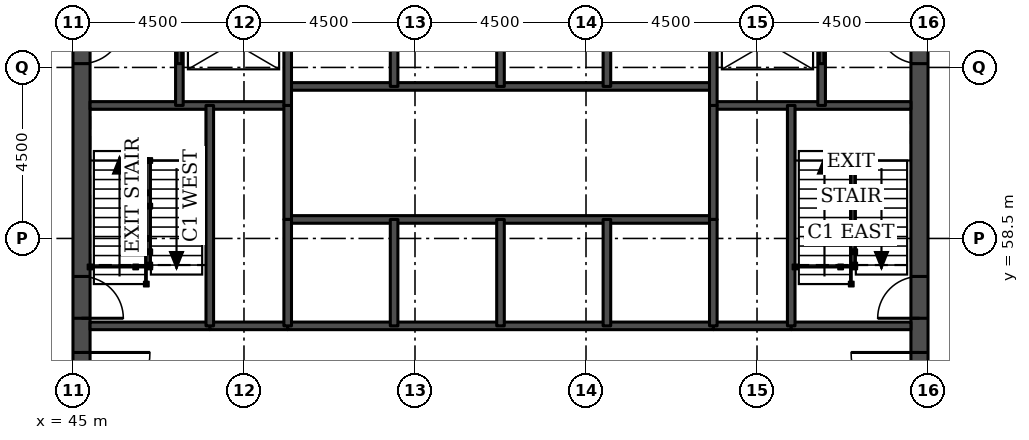
"""IFC4 building model, lengths in metres.
Left out: names, types, materials, properties, quantities, classifications, styles, units other than length and angle.
Written with IfcOpenShell. Run it as: python <this file> out.ifc"""

import sys

from ifc_helpers import new_model, si_unit, direction, frame, frame_2d, origin, place, context, subcontext, project, spatial, rectangle, extrude, element, fill, save


model = new_model("IFC4")
c1 = context("Model", 3, precision=1e-05, world=origin(), true_north=direction((0.0, 1.0)))
c2 = subcontext(c1, "Body", "Model", "MODEL_VIEW")
j1 = project(units=[si_unit("LENGTHUNIT", "METRE"), si_unit("PLANEANGLEUNIT", "RADIAN")], contexts=[c1])
p1 = place(None, origin())
s1 = spatial("IfcSite", under=j1, at=p1, CompositionType="ELEMENT")
p2 = place(p1, origin())
s2 = spatial("IfcBuilding", under=s1, at=p2, CompositionType="ELEMENT")
p3 = place(p2, frame((0.0, 0.0, 101.1)))
s3 = spatial("IfcBuildingStorey", under=s2, at=p3, CompositionType="ELEMENT", Elevation=101.1)
p4 = place(p3, frame((45.225, 49.5, 0.0), z_axis=(0.0, 0.0, 1.0), x_axis=(0.0, 1.0, 0.0)))
e1 = element("IfcWall", 1, at=p4, inside=s3, PredefinedType="SHEAR", context=c2, shape_type="SweptSolid", body=[
    extrude(rectangle(XDim=22.5, YDim=0.45, at=frame_2d((11.25, 0.0))), origin(), (0.0, 0.0, 1.0), 3.7),
])
p5 = place(p4, frame((4.2, 0.0, 0.0)))
e2 = element("IfcOpeningElement", 2, at=p5, cuts=e1, PredefinedType="OPENING", context=c2, shape_type="SweptSolid", body=[
    extrude(rectangle(XDim=1.8, YDim=2.1, at=frame_2d((0.9, 1.05))), frame((0.0, 0.235, 0.0), z_axis=(0.0, -1.0, 0.0), x_axis=(1.0, 0.0, 0.0)), (0.0, 0.0, 1.0), 0.47),
])
p6 = place(p4, frame((6.9, 0.0, 0.0)))
e3 = element("IfcOpeningElement", 3, at=p6, cuts=e1, PredefinedType="OPENING", context=c2, shape_type="SweptSolid", body=[
    extrude(rectangle(XDim=1.1, YDim=2.1, at=frame_2d((0.55, 1.05))), frame((0.0, 0.235, 0.0), z_axis=(0.0, -1.0, 0.0), x_axis=(1.0, 0.0, 0.0)), (0.0, 0.0, 1.0), 0.47),
])
p7 = place(p4, frame((13.6, 0.0, 0.0)))
e4 = element("IfcOpeningElement", 4, at=p7, cuts=e1, PredefinedType="OPENING", context=c2, shape_type="SweptSolid", body=[
    extrude(rectangle(XDim=1.1, YDim=2.1, at=frame_2d((0.55, 1.05))), frame((0.0, 0.235, 0.0), z_axis=(0.0, -1.0, 0.0), x_axis=(1.0, 0.0, 0.0)), (0.0, 0.0, 1.0), 0.47),
])
p8 = place(p4, frame((16.5, 0.0, 0.0)))
e5 = element("IfcOpeningElement", 5, at=p8, cuts=e1, PredefinedType="OPENING", context=c2, shape_type="SweptSolid", body=[
    extrude(rectangle(XDim=1.8, YDim=2.1, at=frame_2d((0.9, 1.05))), frame((0.0, 0.235, 0.0), z_axis=(0.0, -1.0, 0.0), x_axis=(1.0, 0.0, 0.0)), (0.0, 0.0, 1.0), 0.47),
])
p9 = place(p3, frame((67.275, 49.5, 0.0), z_axis=(0.0, 0.0, 1.0), x_axis=(0.0, 1.0, 0.0)))
e6 = element("IfcWall", 6, at=p9, inside=s3, PredefinedType="SHEAR", context=c2, shape_type="SweptSolid", body=[
    extrude(rectangle(XDim=22.5, YDim=0.45, at=frame_2d((11.25, 0.0))), origin(), (0.0, 0.0, 1.0), 3.7),
])
p10 = place(p9, frame((4.2, 0.0, 0.0)))
e7 = element("IfcOpeningElement", 7, at=p10, cuts=e6, PredefinedType="OPENING", context=c2, shape_type="SweptSolid", body=[
    extrude(rectangle(XDim=1.8, YDim=2.1, at=frame_2d((0.9, 1.05))), frame((0.0, 0.235, 0.0), z_axis=(0.0, -1.0, 0.0), x_axis=(1.0, 0.0, 0.0)), (0.0, 0.0, 1.0), 0.47),
])
p11 = place(p9, frame((6.9, 0.0, 0.0)))
e8 = element("IfcOpeningElement", 8, at=p11, cuts=e6, PredefinedType="OPENING", context=c2, shape_type="SweptSolid", body=[
    extrude(rectangle(XDim=1.1, YDim=2.1, at=frame_2d((0.55, 1.05))), frame((0.0, 0.235, 0.0), z_axis=(0.0, -1.0, 0.0), x_axis=(1.0, 0.0, 0.0)), (0.0, 0.0, 1.0), 0.47),
])
p12 = place(p9, frame((13.6, 0.0, 0.0)))
e9 = element("IfcOpeningElement", 9, at=p12, cuts=e6, PredefinedType="OPENING", context=c2, shape_type="SweptSolid", body=[
    extrude(rectangle(XDim=1.1, YDim=2.1, at=frame_2d((0.55, 1.05))), frame((0.0, 0.235, 0.0), z_axis=(0.0, -1.0, 0.0), x_axis=(1.0, 0.0, 0.0)), (0.0, 0.0, 1.0), 0.47),
])
p13 = place(p9, frame((16.5, 0.0, 0.0)))
e10 = element("IfcOpeningElement", 10, at=p13, cuts=e6, PredefinedType="OPENING", context=c2, shape_type="SweptSolid", body=[
    extrude(rectangle(XDim=1.8, YDim=2.1, at=frame_2d((0.9, 1.05))), frame((0.0, 0.235, 0.0), z_axis=(0.0, -1.0, 0.0), x_axis=(1.0, 0.0, 0.0)), (0.0, 0.0, 1.0), 0.47),
])
for number, where, z_axis, x_axis in (
    (11, (48.6, 56.2, 0.0), (0.0, 0.0, 1.0), (1.0, 0.0, 0.0)),
    (12, (61.85, 56.2, 0.0), (0.0, 0.0, 1.0), (1.0, 0.0, 0.0)),
):
    element("IfcWall", number, at=place(p3, frame(where, z_axis=z_axis, x_axis=x_axis)), inside=s3, PredefinedType="SOLIDWALL", context=c2, shape_type="SweptSolid", body=[
        extrude(rectangle(XDim=2.05, YDim=0.2, at=frame_2d((1.025, 0.0))), origin(), (0.0, 0.0, 1.0), 3.55),
    ])
p14 = place(p3, frame((45.45, 56.2, 0.0), z_axis=(0.0, 0.0, 1.0), x_axis=(1.0, 0.0, 0.0)))
e13 = element("IfcWall", 13, at=p14, inside=s3, PredefinedType="SOLIDWALL", context=c2, shape_type="SweptSolid", body=[
    extrude(rectangle(XDim=3.15, YDim=0.2, at=frame_2d((1.575, 0.0))), origin(), (0.0, 0.0, 1.0), 3.55),
])
p15 = place(p3, frame((50.65, 56.2, 0.0), z_axis=(0.0, 0.0, 1.0), x_axis=(1.0, 0.0, 0.0)))
e14 = element("IfcWall", 14, at=p15, inside=s3, PredefinedType="SOLIDWALL", context=c2, shape_type="SweptSolid", body=[
    extrude(rectangle(XDim=11.2, YDim=0.2, at=frame_2d((5.6, 0.0))), origin(), (0.0, 0.0, 1.0), 3.55),
])
p16 = place(p3, frame((63.9, 56.2, 0.0), z_axis=(0.0, 0.0, 1.0), x_axis=(1.0, 0.0, 0.0)))
e15 = element("IfcWall", 15, at=p16, inside=s3, PredefinedType="SOLIDWALL", context=c2, shape_type="SweptSolid", body=[
    extrude(rectangle(XDim=3.15, YDim=0.2, at=frame_2d((1.575, 0.0))), origin(), (0.0, 0.0, 1.0), 3.55),
])
p17 = place(p3, frame((50.65, 59.0, 0.0), z_axis=(0.0, 0.0, 1.0), x_axis=(1.0, 0.0, 0.0)))
e16 = element("IfcWall", 16, at=p17, inside=s3, PredefinedType="SOLIDWALL", context=c2, shape_type="SweptSolid", body=[
    extrude(rectangle(XDim=11.2, YDim=0.2, at=frame_2d((5.6, 0.0))), origin(), (0.0, 0.0, 1.0), 3.7),
])
for number, where, z_axis, x_axis in (
    (17, (45.45, 62.0, 0.0), (0.0, 0.0, 1.0), (1.0, 0.0, 0.0)),
    (18, (61.85, 62.0, 0.0), (0.0, 0.0, 1.0), (1.0, 0.0, 0.0)),
):
    element("IfcWall", number, at=place(p3, frame(where, z_axis=z_axis, x_axis=x_axis)), inside=s3, PredefinedType="SOLIDWALL", context=c2, shape_type="SweptSolid", body=[
        extrude(rectangle(XDim=5.2, YDim=0.2, at=frame_2d((2.6, 0.0))), origin(), (0.0, 0.0, 1.0), 3.55),
    ])
p18 = place(p3, frame((50.65, 62.5, 0.0), z_axis=(0.0, 0.0, 1.0), x_axis=(1.0, 0.0, 0.0)))
e19 = element("IfcWall", 19, at=p18, inside=s3, PredefinedType="SOLIDWALL", context=c2, shape_type="SweptSolid", body=[
    extrude(rectangle(XDim=11.2, YDim=0.2, at=frame_2d((5.6, 0.0))), origin(), (0.0, 0.0, 1.0), 3.7),
])
p19 = place(p3, frame((47.8, 62.0, 0.0), z_axis=(0.0, 0.0, 1.0), x_axis=(0.0, 1.0, 0.0)))
e20 = element("IfcWall", 20, at=p19, inside=s3, PredefinedType="SOLIDWALL", context=c2, shape_type="SweptSolid", body=[
    extrude(rectangle(XDim=3.3, YDim=0.2, at=frame_2d((1.65, 0.0))), origin(), (0.0, 0.0, 1.0), 3.55),
])
p20 = place(p19, frame((1.1, 0.0, 0.0)))
e21 = element("IfcOpeningElement", 21, at=p20, cuts=e20, PredefinedType="OPENING", context=c2, shape_type="SweptSolid", body=[
    extrude(rectangle(XDim=1.1, YDim=2.1, at=frame_2d((0.55, 1.05))), frame((0.0, 0.11, 0.0), z_axis=(0.0, -1.0, 0.0), x_axis=(1.0, 0.0, 0.0)), (0.0, 0.0, 1.0), 0.22),
])
p21 = place(p3, frame((48.6, 56.2, 0.0), z_axis=(0.0, 0.0, 1.0), x_axis=(0.0, 1.0, 0.0)))
e22 = element("IfcWall", 22, at=p21, inside=s3, PredefinedType="SOLIDWALL", context=c2, shape_type="SweptSolid", body=[
    extrude(rectangle(XDim=5.8, YDim=0.2, at=frame_2d((2.9, 0.0))), origin(), (0.0, 0.0, 1.0), 3.55),
])
p22 = place(p3, frame((50.65, 59.0, 0.0), z_axis=(0.0, 0.0, 1.0), x_axis=(0.0, 1.0, 0.0)))
e23 = element("IfcWall", 23, at=p22, inside=s3, PredefinedType="SOLIDWALL", context=c2, shape_type="SweptSolid", body=[
    extrude(rectangle(XDim=3.0, YDim=0.2, at=frame_2d((1.5, 0.0))), origin(), (0.0, 0.0, 1.0), 3.7),
])
p23 = place(p3, frame((50.65, 56.2, 0.0), z_axis=(0.0, 0.0, 1.0), x_axis=(0.0, 1.0, 0.0)))
e24 = element("IfcWall", 24, at=p23, inside=s3, PredefinedType="SOLIDWALL", context=c2, shape_type="SweptSolid", body=[
    extrude(rectangle(XDim=2.8, YDim=0.2, at=frame_2d((1.4, 0.0))), origin(), (0.0, 0.0, 1.0), 3.55),
])
p24 = place(p3, frame((50.65, 62.0, 0.0), z_axis=(0.0, 0.0, 1.0), x_axis=(0.0, 1.0, 0.0)))
e25 = element("IfcWall", 25, at=p24, inside=s3, PredefinedType="SOLIDWALL", context=c2, shape_type="SweptSolid", body=[
    extrude(rectangle(XDim=3.3, YDim=0.2, at=frame_2d((1.65, 0.0))), origin(), (0.0, 0.0, 1.0), 3.55),
])
for number, where, z_axis, x_axis in (
    (26, (53.45, 56.2, 0.0), (0.0, 0.0, 1.0), (0.0, 1.0, 0.0)),
    (27, (53.45, 62.5, 0.0), (0.0, 0.0, 1.0), (0.0, 1.0, 0.0)),
    (28, (56.25, 56.2, 0.0), (0.0, 0.0, 1.0), (0.0, 1.0, 0.0)),
    (29, (56.25, 62.5, 0.0), (0.0, 0.0, 1.0), (0.0, 1.0, 0.0)),
    (30, (59.05, 56.2, 0.0), (0.0, 0.0, 1.0), (0.0, 1.0, 0.0)),
    (31, (59.05, 62.5, 0.0), (0.0, 0.0, 1.0), (0.0, 1.0, 0.0)),
):
    element("IfcWall", number, at=place(p3, frame(where, z_axis=z_axis, x_axis=x_axis)), inside=s3, PredefinedType="SOLIDWALL", context=c2, shape_type="SweptSolid", body=[
        extrude(rectangle(XDim=2.8, YDim=0.2, at=frame_2d((1.4, 0.0))), origin(), (0.0, 0.0, 1.0), 3.55),
    ])
p25 = place(p3, frame((61.85, 59.0, 0.0), z_axis=(0.0, 0.0, 1.0), x_axis=(0.0, 1.0, 0.0)))
e32 = element("IfcWall", 32, at=p25, inside=s3, PredefinedType="SOLIDWALL", context=c2, shape_type="SweptSolid", body=[
    extrude(rectangle(XDim=3.0, YDim=0.2, at=frame_2d((1.5, 0.0))), origin(), (0.0, 0.0, 1.0), 3.7),
])
p26 = place(p3, frame((61.85, 56.2, 0.0), z_axis=(0.0, 0.0, 1.0), x_axis=(0.0, 1.0, 0.0)))
e33 = element("IfcWall", 33, at=p26, inside=s3, PredefinedType="SOLIDWALL", context=c2, shape_type="SweptSolid", body=[
    extrude(rectangle(XDim=2.8, YDim=0.2, at=frame_2d((1.4, 0.0))), origin(), (0.0, 0.0, 1.0), 3.55),
])
p27 = place(p3, frame((61.85, 62.0, 0.0), z_axis=(0.0, 0.0, 1.0), x_axis=(0.0, 1.0, 0.0)))
e34 = element("IfcWall", 34, at=p27, inside=s3, PredefinedType="SOLIDWALL", context=c2, shape_type="SweptSolid", body=[
    extrude(rectangle(XDim=3.3, YDim=0.2, at=frame_2d((1.65, 0.0))), origin(), (0.0, 0.0, 1.0), 3.55),
])
p28 = place(p3, frame((63.9, 56.2, 0.0), z_axis=(0.0, 0.0, 1.0), x_axis=(0.0, 1.0, 0.0)))
e35 = element("IfcWall", 35, at=p28, inside=s3, PredefinedType="SOLIDWALL", context=c2, shape_type="SweptSolid", body=[
    extrude(rectangle(XDim=5.8, YDim=0.2, at=frame_2d((2.9, 0.0))), origin(), (0.0, 0.0, 1.0), 3.55),
])
p29 = place(p3, frame((64.7, 62.0, 0.0), z_axis=(0.0, 0.0, 1.0), x_axis=(0.0, 1.0, 0.0)))
e36 = element("IfcWall", 36, at=p29, inside=s3, PredefinedType="SOLIDWALL", context=c2, shape_type="SweptSolid", body=[
    extrude(rectangle(XDim=3.3, YDim=0.2, at=frame_2d((1.65, 0.0))), origin(), (0.0, 0.0, 1.0), 3.55),
])
p30 = place(p29, frame((1.1, 0.0, 0.0)))
e37 = element("IfcOpeningElement", 37, at=p30, cuts=e36, PredefinedType="OPENING", context=c2, shape_type="SweptSolid", body=[
    extrude(rectangle(XDim=1.1, YDim=2.1, at=frame_2d((0.55, 1.05))), frame((0.0, 0.11, 0.0), z_axis=(0.0, -1.0, 0.0), x_axis=(1.0, 0.0, 0.0)), (0.0, 0.0, 1.0), 0.22),
])
p31 = place(p20, origin())
e38 = element("IfcDoor", 38, at=p31, inside=s3, OperationType="DOUBLE_DOOR_SLIDING", PredefinedType="DOOR", context=c2, shape_type="SweptSolid", body=[
    extrude(rectangle(XDim=1.1, YDim=2.1, at=frame_2d((0.55, 1.05))), frame((0.0, 0.025, 0.0), z_axis=(0.0, -1.0, 0.0), x_axis=(1.0, 0.0, 0.0)), (0.0, 0.0, 1.0), 0.05),
])
fill(e21, e38)
p32 = place(p30, origin())
e39 = element("IfcDoor", 39, at=p32, inside=s3, OperationType="DOUBLE_DOOR_SLIDING", PredefinedType="DOOR", context=c2, shape_type="SweptSolid", body=[
    extrude(rectangle(XDim=1.1, YDim=2.1, at=frame_2d((0.55, 1.05))), frame((0.0, 0.025, 0.0), z_axis=(0.0, -1.0, 0.0), x_axis=(1.0, 0.0, 0.0)), (0.0, 0.0, 1.0), 0.05),
])
fill(e37, e39)
p33 = place(p5, frame((1.8, 0.0, 0.0), z_axis=(0.0, 0.0, 1.0), x_axis=(-1.0, 0.0, 0.0)))
e40 = element("IfcDoor", 40, at=p33, inside=s3, OperationType="SINGLE_SWING_LEFT", PredefinedType="DOOR", context=c2, shape_type="SweptSolid", body=[
    extrude(rectangle(XDim=1.8, YDim=2.1, at=frame_2d((0.9, 1.05))), frame((0.0, 0.025, 0.0), z_axis=(0.0, -1.0, 0.0), x_axis=(1.0, 0.0, 0.0)), (0.0, 0.0, 1.0), 0.05),
])
fill(e2, e40)
p34 = place(p6, frame((1.1, 0.0, 0.0), z_axis=(0.0, 0.0, 1.0), x_axis=(-1.0, 0.0, 0.0)))
e41 = element("IfcDoor", 41, at=p34, inside=s3, OperationType="SINGLE_SWING_RIGHT", PredefinedType="DOOR", context=c2, shape_type="SweptSolid", body=[
    extrude(rectangle(XDim=1.1, YDim=2.1, at=frame_2d((0.55, 1.05))), frame((0.0, 0.025, 0.0), z_axis=(0.0, -1.0, 0.0), x_axis=(1.0, 0.0, 0.0)), (0.0, 0.0, 1.0), 0.05),
])
fill(e3, e41)
p35 = place(p7, frame((1.1, 0.0, 0.0), z_axis=(0.0, 0.0, 1.0), x_axis=(-1.0, 0.0, 0.0)))
e42 = element("IfcDoor", 42, at=p35, inside=s3, OperationType="SINGLE_SWING_LEFT", PredefinedType="DOOR", context=c2, shape_type="SweptSolid", body=[
    extrude(rectangle(XDim=1.1, YDim=2.1, at=frame_2d((0.55, 1.05))), frame((0.0, 0.025, 0.0), z_axis=(0.0, -1.0, 0.0), x_axis=(1.0, 0.0, 0.0)), (0.0, 0.0, 1.0), 0.05),
])
fill(e4, e42)
p36 = place(p10, origin())
e43 = element("IfcDoor", 43, at=p36, inside=s3, OperationType="SINGLE_SWING_RIGHT", PredefinedType="DOOR", context=c2, shape_type="SweptSolid", body=[
    extrude(rectangle(XDim=1.8, YDim=2.1, at=frame_2d((0.9, 1.05))), frame((0.0, 0.025, 0.0), z_axis=(0.0, -1.0, 0.0), x_axis=(1.0, 0.0, 0.0)), (0.0, 0.0, 1.0), 0.05),
])
fill(e7, e43)
p37 = place(p11, origin())
e44 = element("IfcDoor", 44, at=p37, inside=s3, OperationType="SINGLE_SWING_LEFT", PredefinedType="DOOR", context=c2, shape_type="SweptSolid", body=[
    extrude(rectangle(XDim=1.1, YDim=2.1, at=frame_2d((0.55, 1.05))), frame((0.0, 0.025, 0.0), z_axis=(0.0, -1.0, 0.0), x_axis=(1.0, 0.0, 0.0)), (0.0, 0.0, 1.0), 0.05),
])
fill(e8, e44)
p38 = place(p12, origin())
e45 = element("IfcDoor", 45, at=p38, inside=s3, OperationType="SINGLE_SWING_RIGHT", PredefinedType="DOOR", context=c2, shape_type="SweptSolid", body=[
    extrude(rectangle(XDim=1.1, YDim=2.1, at=frame_2d((0.55, 1.05))), frame((0.0, 0.025, 0.0), z_axis=(0.0, -1.0, 0.0), x_axis=(1.0, 0.0, 0.0)), (0.0, 0.0, 1.0), 0.05),
])
fill(e9, e45)
save(model, sys.argv[1])
